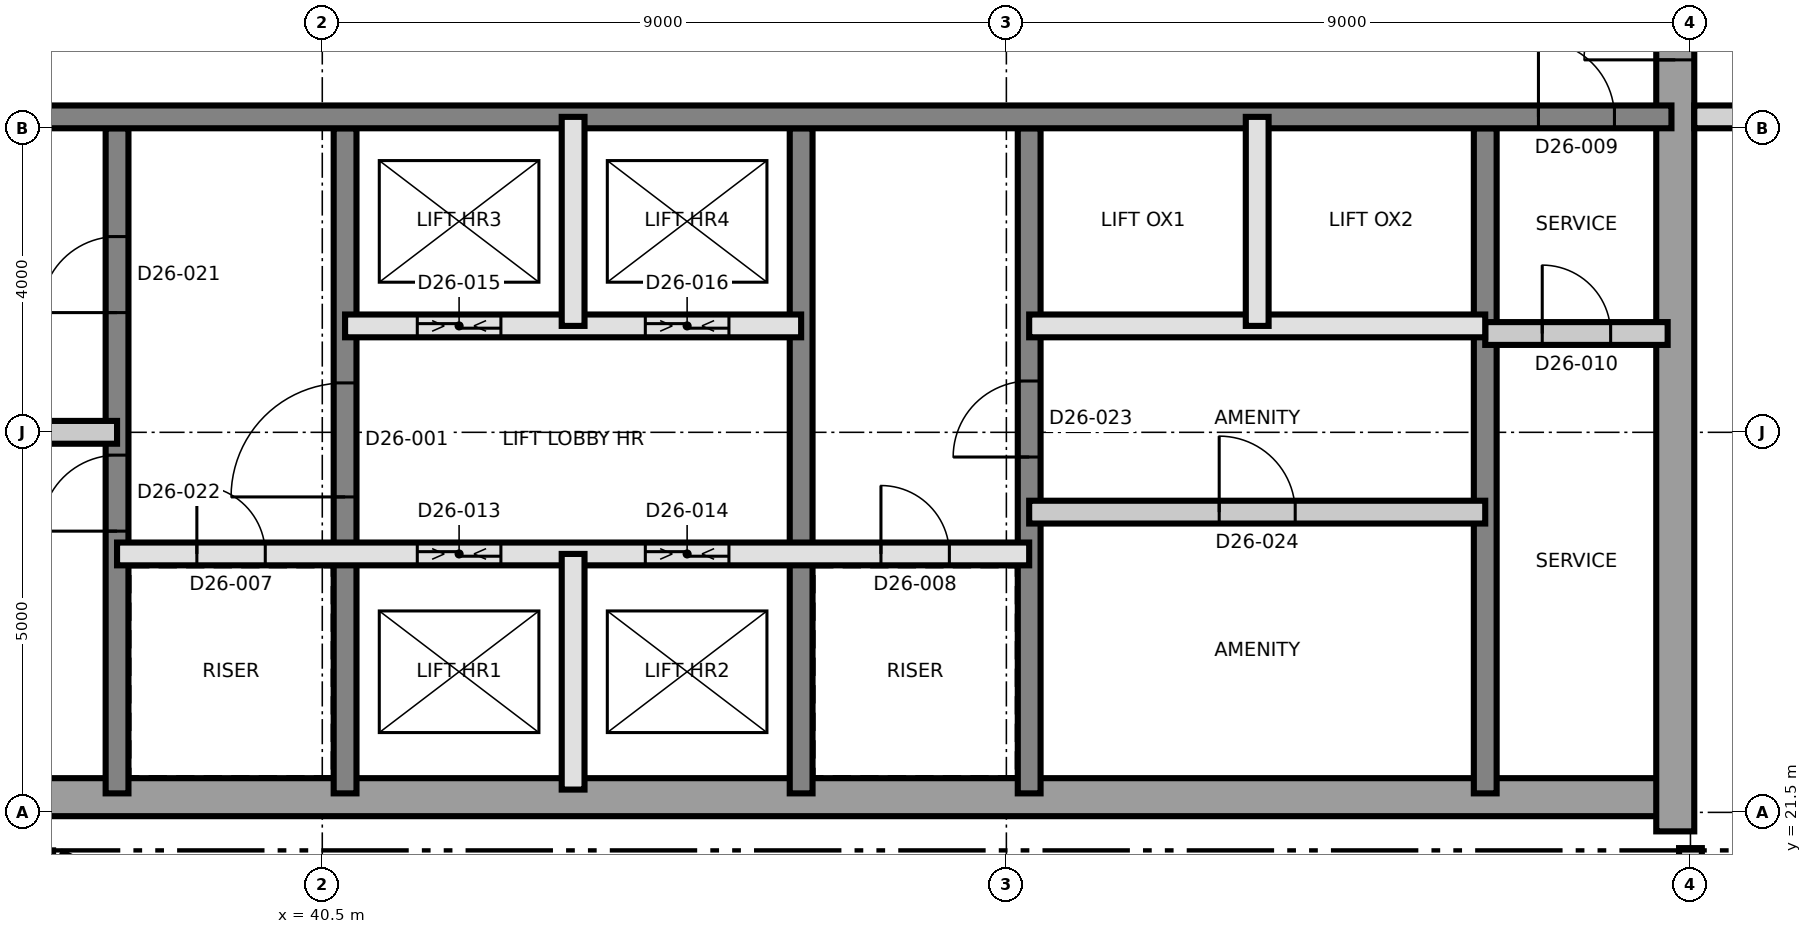
"""IFC4 building model, lengths in metres.
Left out: names, types, materials, properties, quantities, classifications, styles, units other than length and angle.
Written with IfcOpenShell. Run it as: python <this file> out.ifc"""

import sys

from ifc_helpers import new_model, si_unit, direction, frame, frame_2d, origin, place, context, subcontext, project, spatial, rectangle, extrude, element, fill, save


model = new_model("IFC4")
c1 = context("Model", 3, precision=1e-05, world=origin(), true_north=direction((0.0, 1.0)))
c2 = subcontext(c1, "Body", "Model", "MODEL_VIEW")
j1 = project(units=[si_unit("LENGTHUNIT", "METRE"), si_unit("PLANEANGLEUNIT", "RADIAN")], contexts=[c1])
p1 = place(None, origin())
s1 = spatial("IfcSite", under=j1, at=p1, CompositionType="ELEMENT")
p2 = place(p1, origin())
s2 = spatial("IfcBuilding", under=s1, at=p2, CompositionType="ELEMENT")
p3 = place(p2, frame((0.0, 0.0, 236.5)))
s3 = spatial("IfcBuildingStorey", under=s2, at=p3, CompositionType="ELEMENT", Elevation=236.5)
p4 = place(p3, frame((31.25, 21.7, 0.0), z_axis=(0.0, 0.0, 1.0), x_axis=(1.0, 0.0, 0.0)))
e1 = element("IfcWall", 1, at=p4, inside=s3, PredefinedType="SHEAR", context=c2, shape_type="SweptSolid", body=[
    extrude(rectangle(XDim=27.0, YDim=0.5, at=frame_2d((13.5, 0.0))), origin(), (0.0, 0.0, 1.0), 3.7),
])
p5 = place(p3, frame((58.3, 21.25, 0.0), z_axis=(0.0, 0.0, 1.0), x_axis=(0.0, 1.0, 0.0)))
e2 = element("IfcWall", 2, at=p5, inside=s3, PredefinedType="SHEAR", context=c2, shape_type="SweptSolid", body=[
    extrude(rectangle(XDim=18.5, YDim=0.5, at=frame_2d((9.25, 0.0))), origin(), (0.0, 0.0, 1.0), 3.7),
])
p6 = place(p5, frame((10.15, 0.0, 0.0)))
e3 = element("IfcOpeningElement", 3, at=p6, cuts=e2, PredefinedType="OPENING", context=c2, shape_type="SweptSolid", body=[
    extrude(rectangle(XDim=1.2, YDim=2.1, at=frame_2d((0.6, 1.05))), frame((0.0, 0.26, 0.0), z_axis=(0.0, -1.0, 0.0), x_axis=(1.0, 0.0, 0.0)), (0.0, 0.0, 1.0), 0.52),
])
p7 = place(p3, frame((37.8, 21.75, 0.0), z_axis=(0.0, 0.0, 1.0), x_axis=(0.0, 1.0, 0.0)))
e4 = element("IfcWall", 4, at=p7, inside=s3, PredefinedType="SHEAR", context=c2, shape_type="SweptSolid", body=[
    extrude(rectangle(XDim=8.75, YDim=0.3, at=frame_2d((4.375, 0.0))), origin(), (0.0, 0.0, 1.0), 3.7),
])
p8 = place(p7, frame((6.325, 0.0, 0.0)))
e5 = element("IfcOpeningElement", 5, at=p8, cuts=e4, PredefinedType="OPENING", context=c2, shape_type="SweptSolid", body=[
    extrude(rectangle(XDim=1.0, YDim=2.1, at=frame_2d((0.5, 1.05))), frame((0.0, 0.16, 0.0), z_axis=(0.0, -1.0, 0.0), x_axis=(1.0, 0.0, 0.0)), (0.0, 0.0, 1.0), 0.32),
])
p9 = place(p7, frame((3.45, 0.0, 0.0)))
e6 = element("IfcOpeningElement", 6, at=p9, cuts=e4, PredefinedType="OPENING", context=c2, shape_type="SweptSolid", body=[
    extrude(rectangle(XDim=1.0, YDim=2.1, at=frame_2d((0.5, 1.05))), frame((0.0, 0.16, 0.0), z_axis=(0.0, -1.0, 0.0), x_axis=(1.0, 0.0, 0.0)), (0.0, 0.0, 1.0), 0.32),
])
p10 = place(p3, frame((40.8, 21.75, 0.0), z_axis=(0.0, 0.0, 1.0), x_axis=(0.0, 1.0, 0.0)))
e7 = element("IfcWall", 7, at=p10, inside=s3, PredefinedType="SHEAR", context=c2, shape_type="SweptSolid", body=[
    extrude(rectangle(XDim=8.75, YDim=0.3, at=frame_2d((4.375, 0.0))), origin(), (0.0, 0.0, 1.0), 3.7),
])
p11 = place(p10, frame((3.9, 0.0, 0.0)))
e8 = element("IfcOpeningElement", 8, at=p11, cuts=e7, PredefinedType="OPENING", context=c2, shape_type="SweptSolid", body=[
    extrude(rectangle(XDim=1.5, YDim=2.1, at=frame_2d((0.75, 1.05))), frame((0.0, 0.16, 0.0), z_axis=(0.0, -1.0, 0.0), x_axis=(1.0, 0.0, 0.0)), (0.0, 0.0, 1.0), 0.32),
])
p12 = place(p3, frame((46.8, 21.75, 0.0), z_axis=(0.0, 0.0, 1.0), x_axis=(0.0, 1.0, 0.0)))
e9 = element("IfcWall", 9, at=p12, inside=s3, PredefinedType="SHEAR", context=c2, shape_type="SweptSolid", body=[
    extrude(rectangle(XDim=8.75, YDim=0.3, at=frame_2d((4.375, 0.0))), origin(), (0.0, 0.0, 1.0), 3.7),
])
p13 = place(p3, frame((49.8, 21.75, 0.0), z_axis=(0.0, 0.0, 1.0), x_axis=(0.0, 1.0, 0.0)))
e10 = element("IfcWall", 10, at=p13, inside=s3, PredefinedType="SHEAR", context=c2, shape_type="SweptSolid", body=[
    extrude(rectangle(XDim=8.75, YDim=0.3, at=frame_2d((4.375, 0.0))), origin(), (0.0, 0.0, 1.0), 3.7),
])
p14 = place(p13, frame((4.425, 0.0, 0.0)))
e11 = element("IfcOpeningElement", 11, at=p14, cuts=e10, PredefinedType="OPENING", context=c2, shape_type="SweptSolid", body=[
    extrude(rectangle(XDim=1.0, YDim=2.1, at=frame_2d((0.5, 1.05))), frame((0.0, 0.16, 0.0), z_axis=(0.0, -1.0, 0.0), x_axis=(1.0, 0.0, 0.0)), (0.0, 0.0, 1.0), 0.32),
])
p15 = place(p3, frame((55.8, 21.75, 0.0), z_axis=(0.0, 0.0, 1.0), x_axis=(0.0, 1.0, 0.0)))
e12 = element("IfcWall", 12, at=p15, inside=s3, PredefinedType="SHEAR", context=c2, shape_type="SweptSolid", body=[
    extrude(rectangle(XDim=8.75, YDim=0.3, at=frame_2d((4.375, 0.0))), origin(), (0.0, 0.0, 1.0), 3.7),
])
p16 = place(p3, frame((31.75, 30.65, 0.0), z_axis=(0.0, 0.0, 1.0), x_axis=(1.0, 0.0, 0.0)))
e13 = element("IfcWall", 13, at=p16, inside=s3, PredefinedType="SHEAR", context=c2, shape_type="SweptSolid", body=[
    extrude(rectangle(XDim=26.5, YDim=0.3, at=frame_2d((13.25, 0.0))), origin(), (0.0, 0.0, 1.0), 3.7),
])
p17 = place(p16, frame((24.75, 0.0, 0.0)))
e14 = element("IfcOpeningElement", 14, at=p17, cuts=e13, PredefinedType="OPENING", context=c2, shape_type="SweptSolid", body=[
    extrude(rectangle(XDim=1.0, YDim=2.1, at=frame_2d((0.5, 1.05))), frame((0.0, 0.16, 0.0), z_axis=(0.0, -1.0, 0.0), x_axis=(1.0, 0.0, 0.0)), (0.0, 0.0, 1.0), 0.32),
])
p18 = place(p3, frame((31.36, 20.85, 0.0), z_axis=(0.0, 0.0, 1.0), x_axis=(1.0, 0.0, 0.0)))
e15 = element("IfcWall", 15, at=p18, inside=s3, PredefinedType="SOLIDWALL", context=c2, shape_type="SweptSolid", body=[
    extrude(rectangle(XDim=5.599, YDim=0.3, at=frame_2d((2.8, 0.0))), origin(), (0.0, 0.0, 1.0), 3.4),
])
p19 = place(p3, frame((37.025, 20.834, 0.0), z_axis=(0.0, 0.0, 1.0), x_axis=(0.896925860522, -0.442180959254, 0.0)))
e16 = element("IfcWall", 16, at=p19, inside=s3, PredefinedType="SOLIDWALL", context=c2, shape_type="SweptSolid", body=[
    extrude(rectangle(XDim=1.399, YDim=0.3, at=frame_2d((0.7, 0.0))), origin(), (0.0, 0.0, 1.0), 3.4),
])
p20 = place(p3, frame((37.8, 24.9, 0.0), z_axis=(0.0, 0.0, 1.0), x_axis=(1.0, 0.0, 0.0)))
e17 = element("IfcWall", 17, at=p20, inside=s3, PredefinedType="SOLIDWALL", context=c2, shape_type="SweptSolid", body=[
    extrude(rectangle(XDim=12.0, YDim=0.3, at=frame_2d((6.0, 0.0))), origin(), (0.0, 0.0, 1.0), 3.4),
])
p21 = place(p20, frame((1.05, 0.0, 0.0)))
e18 = element("IfcOpeningElement", 18, at=p21, cuts=e17, PredefinedType="OPENING", context=c2, shape_type="SweptSolid", body=[
    extrude(rectangle(XDim=0.9, YDim=2.1, at=frame_2d((0.45, 1.05))), frame((0.0, 0.16, 0.0), z_axis=(0.0, -1.0, 0.0), x_axis=(1.0, 0.0, 0.0)), (0.0, 0.0, 1.0), 0.32),
])
p22 = place(p20, frame((10.05, 0.0, 0.0)))
e19 = element("IfcOpeningElement", 19, at=p22, cuts=e17, PredefinedType="OPENING", context=c2, shape_type="SweptSolid", body=[
    extrude(rectangle(XDim=0.9, YDim=2.1, at=frame_2d((0.45, 1.05))), frame((0.0, 0.16, 0.0), z_axis=(0.0, -1.0, 0.0), x_axis=(1.0, 0.0, 0.0)), (0.0, 0.0, 1.0), 0.32),
])
p23 = place(p20, frame((3.95, 0.0, 0.0)))
e20 = element("IfcOpeningElement", 20, at=p23, cuts=e17, PredefinedType="OPENING", context=c2, shape_type="SweptSolid", body=[
    extrude(rectangle(XDim=1.1, YDim=2.4, at=frame_2d((0.55, 1.2))), frame((0.0, 0.16, 0.0), z_axis=(0.0, -1.0, 0.0), x_axis=(1.0, 0.0, 0.0)), (0.0, 0.0, 1.0), 0.32),
])
p24 = place(p20, frame((6.95, 0.0, 0.0)))
e21 = element("IfcOpeningElement", 21, at=p24, cuts=e17, PredefinedType="OPENING", context=c2, shape_type="SweptSolid", body=[
    extrude(rectangle(XDim=1.1, YDim=2.4, at=frame_2d((0.55, 1.2))), frame((0.0, 0.16, 0.0), z_axis=(0.0, -1.0, 0.0), x_axis=(1.0, 0.0, 0.0)), (0.0, 0.0, 1.0), 0.32),
])
p25 = place(p3, frame((49.8, 25.45, 0.0), z_axis=(0.0, 0.0, 1.0), x_axis=(1.0, 0.0, 0.0)))
e22 = element("IfcWall", 22, at=p25, inside=s3, PredefinedType="PARTITIONING", context=c2, shape_type="SweptSolid", body=[
    extrude(rectangle(XDim=6.0, YDim=0.3, at=frame_2d((3.0, 0.0))), origin(), (0.0, 0.0, 1.0), 3.4),
])
p26 = place(p25, frame((2.5, 0.0, 0.0)))
e23 = element("IfcOpeningElement", 23, at=p26, cuts=e22, PredefinedType="OPENING", context=c2, shape_type="SweptSolid", body=[
    extrude(rectangle(XDim=1.0, YDim=2.1, at=frame_2d((0.5, 1.05))), frame((0.0, 0.16, 0.0), z_axis=(0.0, -1.0, 0.0), x_axis=(1.0, 0.0, 0.0)), (0.0, 0.0, 1.0), 0.32),
])
p27 = place(p3, frame((31.8, 26.5, 0.0), z_axis=(0.0, 0.0, 1.0), x_axis=(1.0, 0.0, 0.0)))
e24 = element("IfcWall", 24, at=p27, inside=s3, PredefinedType="PARTITIONING", context=c2, shape_type="SweptSolid", body=[
    extrude(rectangle(XDim=6.0, YDim=0.3, at=frame_2d((3.0, 0.0))), origin(), (0.0, 0.0, 1.0), 3.4),
])
p28 = place(p3, frame((55.8, 27.8, 0.0), z_axis=(0.0, 0.0, 1.0), x_axis=(1.0, 0.0, 0.0)))
e25 = element("IfcWall", 25, at=p28, inside=s3, PredefinedType="PARTITIONING", context=c2, shape_type="SweptSolid", body=[
    extrude(rectangle(XDim=2.4, YDim=0.3, at=frame_2d((1.2, 0.0))), origin(), (0.0, 0.0, 1.0), 3.4),
])
p29 = place(p28, frame((0.75, 0.0, 0.0)))
e26 = element("IfcOpeningElement", 26, at=p29, cuts=e25, PredefinedType="OPENING", context=c2, shape_type="SweptSolid", body=[
    extrude(rectangle(XDim=0.9, YDim=2.1, at=frame_2d((0.45, 1.05))), frame((0.0, 0.16, 0.0), z_axis=(0.0, -1.0, 0.0), x_axis=(1.0, 0.0, 0.0)), (0.0, 0.0, 1.0), 0.32),
])
p30 = place(p3, frame((40.8, 27.9, 0.0), z_axis=(0.0, 0.0, 1.0), x_axis=(1.0, 0.0, 0.0)))
e27 = element("IfcWall", 27, at=p30, inside=s3, PredefinedType="SOLIDWALL", context=c2, shape_type="SweptSolid", body=[
    extrude(rectangle(XDim=6.0, YDim=0.3, at=frame_2d((3.0, 0.0))), origin(), (0.0, 0.0, 1.0), 3.4),
])
p31 = place(p30, frame((0.95, 0.0, 0.0)))
e28 = element("IfcOpeningElement", 28, at=p31, cuts=e27, PredefinedType="OPENING", context=c2, shape_type="SweptSolid", body=[
    extrude(rectangle(XDim=1.1, YDim=2.4, at=frame_2d((0.55, 1.2))), frame((0.0, 0.16, 0.0), z_axis=(0.0, -1.0, 0.0), x_axis=(1.0, 0.0, 0.0)), (0.0, 0.0, 1.0), 0.32),
])
p32 = place(p30, frame((3.95, 0.0, 0.0)))
e29 = element("IfcOpeningElement", 29, at=p32, cuts=e27, PredefinedType="OPENING", context=c2, shape_type="SweptSolid", body=[
    extrude(rectangle(XDim=1.1, YDim=2.4, at=frame_2d((0.55, 1.2))), frame((0.0, 0.16, 0.0), z_axis=(0.0, -1.0, 0.0), x_axis=(1.0, 0.0, 0.0)), (0.0, 0.0, 1.0), 0.32),
])
p33 = place(p3, frame((49.8, 27.9, 0.0), z_axis=(0.0, 0.0, 1.0), x_axis=(1.0, 0.0, 0.0)))
e30 = element("IfcWall", 30, at=p33, inside=s3, PredefinedType="SOLIDWALL", context=c2, shape_type="SweptSolid", body=[
    extrude(rectangle(XDim=6.0, YDim=0.3, at=frame_2d((3.0, 0.0))), origin(), (0.0, 0.0, 1.0), 3.4),
])
p34 = place(p3, frame((43.8, 21.8, 0.0), z_axis=(0.0, 0.0, 1.0), x_axis=(0.0, 1.0, 0.0)))
e31 = element("IfcWall", 31, at=p34, inside=s3, PredefinedType="SOLIDWALL", context=c2, shape_type="SweptSolid", body=[
    extrude(rectangle(XDim=3.1, YDim=0.3, at=frame_2d((1.55, 0.0))), origin(), (0.0, 0.0, 1.0), 3.4),
])
for number, where, z_axis, x_axis in (
    (32, (43.8, 27.9, 0.0), (0.0, 0.0, 1.0), (0.0, 1.0, 0.0)),
    (33, (52.8, 27.9, 0.0), (0.0, 0.0, 1.0), (0.0, 1.0, 0.0)),
):
    element("IfcWall", number, at=place(p3, frame(where, z_axis=z_axis, x_axis=x_axis)), inside=s3, PredefinedType="SOLIDWALL", context=c2, shape_type="SweptSolid", body=[
        extrude(rectangle(XDim=2.75, YDim=0.3, at=frame_2d((1.375, 0.0))), origin(), (0.0, 0.0, 1.0), 3.4),
    ])
p35 = place(p3, frame((58.55, 30.65, 0.0), z_axis=(0.0, 0.0, 1.0), x_axis=(1.0, 0.0, 0.0)))
e34 = element("IfcWall", 34, at=p35, inside=s3, PredefinedType="PARTITIONING", context=c2, shape_type="SweptSolid", body=[
    extrude(rectangle(XDim=26.78, YDim=0.3, at=frame_2d((13.39, 0.0))), origin(), (0.0, 0.0, 1.0), 3.4),
])
p36 = place(p35, frame((1.085, 0.0, 0.0)))
e35 = element("IfcOpeningElement", 35, at=p36, cuts=e34, PredefinedType="OPENING", context=c2, shape_type="SweptSolid", body=[
    extrude(rectangle(XDim=1.2, YDim=2.1, at=frame_2d((0.6, 1.05))), frame((0.0, 0.16, 0.0), z_axis=(0.0, -1.0, 0.0), x_axis=(1.0, 0.0, 0.0)), (0.0, 0.0, 1.0), 0.32),
])
p37 = place(p35, frame((4.335, 0.0, 0.0)))
e36 = element("IfcOpeningElement", 36, at=p37, cuts=e34, PredefinedType="OPENING", context=c2, shape_type="SweptSolid", body=[
    extrude(rectangle(XDim=1.0, YDim=2.1, at=frame_2d((0.5, 1.05))), frame((0.0, 0.16, 0.0), z_axis=(0.0, -1.0, 0.0), x_axis=(1.0, 0.0, 0.0)), (0.0, 0.0, 1.0), 0.32),
])
p38 = place(p35, frame((14.6, 0.0, 0.0)))
e37 = element("IfcOpeningElement", 37, at=p38, cuts=e34, PredefinedType="OPENING", context=c2, shape_type="SweptSolid", body=[
    extrude(rectangle(XDim=1.0, YDim=2.4, at=frame_2d((0.5, 1.2))), frame((0.0, 0.16, 0.0), z_axis=(0.0, -1.0, 0.0), x_axis=(1.0, 0.0, 0.0)), (0.0, 0.0, 1.0), 0.32),
])
p39 = place(p35, frame((20.3, 0.0, 0.0)))
e38 = element("IfcOpeningElement", 38, at=p39, cuts=e34, PredefinedType="OPENING", context=c2, shape_type="SweptSolid", body=[
    extrude(rectangle(XDim=1.0, YDim=2.4, at=frame_2d((0.5, 1.2))), frame((0.0, 0.16, 0.0), z_axis=(0.0, -1.0, 0.0), x_axis=(1.0, 0.0, 0.0)), (0.0, 0.0, 1.0), 0.32),
])
p40 = place(p3, frame((58.5, 19.275, 0.0), z_axis=(0.0, 0.0, 1.0), x_axis=(0.0, 1.0, 0.0)))
e39 = element("IfcWall", 39, at=p40, inside=s3, PredefinedType="PARTITIONING", context=c2, shape_type="SweptSolid", body=[
    extrude(rectangle(XDim=1.755, YDim=0.3, at=frame_2d((0.877, 0.0))), origin(), (0.0, 0.0, 1.0), 3.4),
])
p41 = place(p11, origin())
e40 = element("IfcDoor", 40, at=p41, inside=s3, OperationType="SINGLE_SWING_RIGHT", PredefinedType="DOOR", context=c2, shape_type="SweptSolid", body=[
    extrude(rectangle(XDim=1.5, YDim=2.1, at=frame_2d((0.75, 1.05))), frame((0.0, 0.025, 0.0), z_axis=(0.0, -1.0, 0.0), x_axis=(1.0, 0.0, 0.0)), (0.0, 0.0, 1.0), 0.05),
])
fill(e8, e40)
p42 = place(p21, origin())
e41 = element("IfcDoor", 41, at=p42, inside=s3, OperationType="SINGLE_SWING_LEFT", PredefinedType="DOOR", context=c2, shape_type="SweptSolid", body=[
    extrude(rectangle(XDim=0.9, YDim=2.1, at=frame_2d((0.45, 1.05))), frame((0.0, 0.025, 0.0), z_axis=(0.0, -1.0, 0.0), x_axis=(1.0, 0.0, 0.0)), (0.0, 0.0, 1.0), 0.05),
])
fill(e18, e41)
p43 = place(p22, origin())
e42 = element("IfcDoor", 42, at=p43, inside=s3, OperationType="SINGLE_SWING_RIGHT", PredefinedType="DOOR", context=c2, shape_type="SweptSolid", body=[
    extrude(rectangle(XDim=0.9, YDim=2.1, at=frame_2d((0.45, 1.05))), frame((0.0, 0.025, 0.0), z_axis=(0.0, -1.0, 0.0), x_axis=(1.0, 0.0, 0.0)), (0.0, 0.0, 1.0), 0.05),
])
fill(e19, e42)
p44 = place(p17, origin())
e43 = element("IfcDoor", 43, at=p44, inside=s3, OperationType="SINGLE_SWING_LEFT", PredefinedType="DOOR", context=c2, shape_type="SweptSolid", body=[
    extrude(rectangle(XDim=1.0, YDim=2.1, at=frame_2d((0.5, 1.05))), frame((0.0, 0.025, 0.0), z_axis=(0.0, -1.0, 0.0), x_axis=(1.0, 0.0, 0.0)), (0.0, 0.0, 1.0), 0.05),
])
fill(e14, e43)
p45 = place(p29, origin())
e44 = element("IfcDoor", 44, at=p45, inside=s3, OperationType="SINGLE_SWING_RIGHT", PredefinedType="DOOR", context=c2, shape_type="SweptSolid", body=[
    extrude(rectangle(XDim=0.9, YDim=2.1, at=frame_2d((0.45, 1.05))), frame((0.0, 0.025, 0.0), z_axis=(0.0, -1.0, 0.0), x_axis=(1.0, 0.0, 0.0)), (0.0, 0.0, 1.0), 0.05),
])
fill(e26, e44)
p46 = place(p6, origin())
e45 = element("IfcDoor", 45, at=p46, inside=s3, OperationType="SINGLE_SWING_LEFT", PredefinedType="DOOR", context=c2, shape_type="SweptSolid", body=[
    extrude(rectangle(XDim=1.2, YDim=2.1, at=frame_2d((0.6, 1.05))), frame((0.0, 0.025, 0.0), z_axis=(0.0, -1.0, 0.0), x_axis=(1.0, 0.0, 0.0)), (0.0, 0.0, 1.0), 0.05),
])
fill(e3, e45)
p47 = place(p23, origin())
e46 = element("IfcDoor", 46, at=p47, inside=s3, OperationType="SLIDING_TO_LEFT", PredefinedType="DOOR", context=c2, shape_type="SweptSolid", body=[
    extrude(rectangle(XDim=1.1, YDim=2.4, at=frame_2d((0.55, 1.2))), frame((0.0, 0.025, 0.0), z_axis=(0.0, -1.0, 0.0), x_axis=(1.0, 0.0, 0.0)), (0.0, 0.0, 1.0), 0.05),
])
fill(e20, e46)
p48 = place(p24, origin())
e47 = element("IfcDoor", 47, at=p48, inside=s3, OperationType="SLIDING_TO_LEFT", PredefinedType="DOOR", context=c2, shape_type="SweptSolid", body=[
    extrude(rectangle(XDim=1.1, YDim=2.4, at=frame_2d((0.55, 1.2))), frame((0.0, 0.025, 0.0), z_axis=(0.0, -1.0, 0.0), x_axis=(1.0, 0.0, 0.0)), (0.0, 0.0, 1.0), 0.05),
])
fill(e21, e47)
p49 = place(p31, origin())
e48 = element("IfcDoor", 48, at=p49, inside=s3, OperationType="SLIDING_TO_LEFT", PredefinedType="DOOR", context=c2, shape_type="SweptSolid", body=[
    extrude(rectangle(XDim=1.1, YDim=2.4, at=frame_2d((0.55, 1.2))), frame((0.0, 0.025, 0.0), z_axis=(0.0, -1.0, 0.0), x_axis=(1.0, 0.0, 0.0)), (0.0, 0.0, 1.0), 0.05),
])
fill(e28, e48)
p50 = place(p32, origin())
e49 = element("IfcDoor", 49, at=p50, inside=s3, OperationType="SLIDING_TO_LEFT", PredefinedType="DOOR", context=c2, shape_type="SweptSolid", body=[
    extrude(rectangle(XDim=1.1, YDim=2.4, at=frame_2d((0.55, 1.2))), frame((0.0, 0.025, 0.0), z_axis=(0.0, -1.0, 0.0), x_axis=(1.0, 0.0, 0.0)), (0.0, 0.0, 1.0), 0.05),
])
fill(e29, e49)
p51 = place(p8, origin())
e50 = element("IfcDoor", 50, at=p51, inside=s3, OperationType="SINGLE_SWING_LEFT", PredefinedType="DOOR", context=c2, shape_type="SweptSolid", body=[
    extrude(rectangle(XDim=1.0, YDim=2.1, at=frame_2d((0.5, 1.05))), frame((0.0, 0.025, 0.0), z_axis=(0.0, -1.0, 0.0), x_axis=(1.0, 0.0, 0.0)), (0.0, 0.0, 1.0), 0.05),
])
fill(e5, e50)
p52 = place(p9, origin())
e51 = element("IfcDoor", 51, at=p52, inside=s3, OperationType="SINGLE_SWING_RIGHT", PredefinedType="DOOR", context=c2, shape_type="SweptSolid", body=[
    extrude(rectangle(XDim=1.0, YDim=2.1, at=frame_2d((0.5, 1.05))), frame((0.0, 0.025, 0.0), z_axis=(0.0, -1.0, 0.0), x_axis=(1.0, 0.0, 0.0)), (0.0, 0.0, 1.0), 0.05),
])
fill(e6, e51)
p53 = place(p14, origin())
e52 = element("IfcDoor", 52, at=p53, inside=s3, OperationType="SINGLE_SWING_LEFT", PredefinedType="DOOR", context=c2, shape_type="SweptSolid", body=[
    extrude(rectangle(XDim=1.0, YDim=2.1, at=frame_2d((0.5, 1.05))), frame((0.0, 0.025, 0.0), z_axis=(0.0, -1.0, 0.0), x_axis=(1.0, 0.0, 0.0)), (0.0, 0.0, 1.0), 0.05),
])
fill(e11, e52)
p54 = place(p26, origin())
e53 = element("IfcDoor", 53, at=p54, inside=s3, OperationType="SINGLE_SWING_RIGHT", PredefinedType="DOOR", context=c2, shape_type="SweptSolid", body=[
    extrude(rectangle(XDim=1.0, YDim=2.1, at=frame_2d((0.5, 1.05))), frame((0.0, 0.025, 0.0), z_axis=(0.0, -1.0, 0.0), x_axis=(1.0, 0.0, 0.0)), (0.0, 0.0, 1.0), 0.05),
])
fill(e23, e53)
save(model, sys.argv[1])
